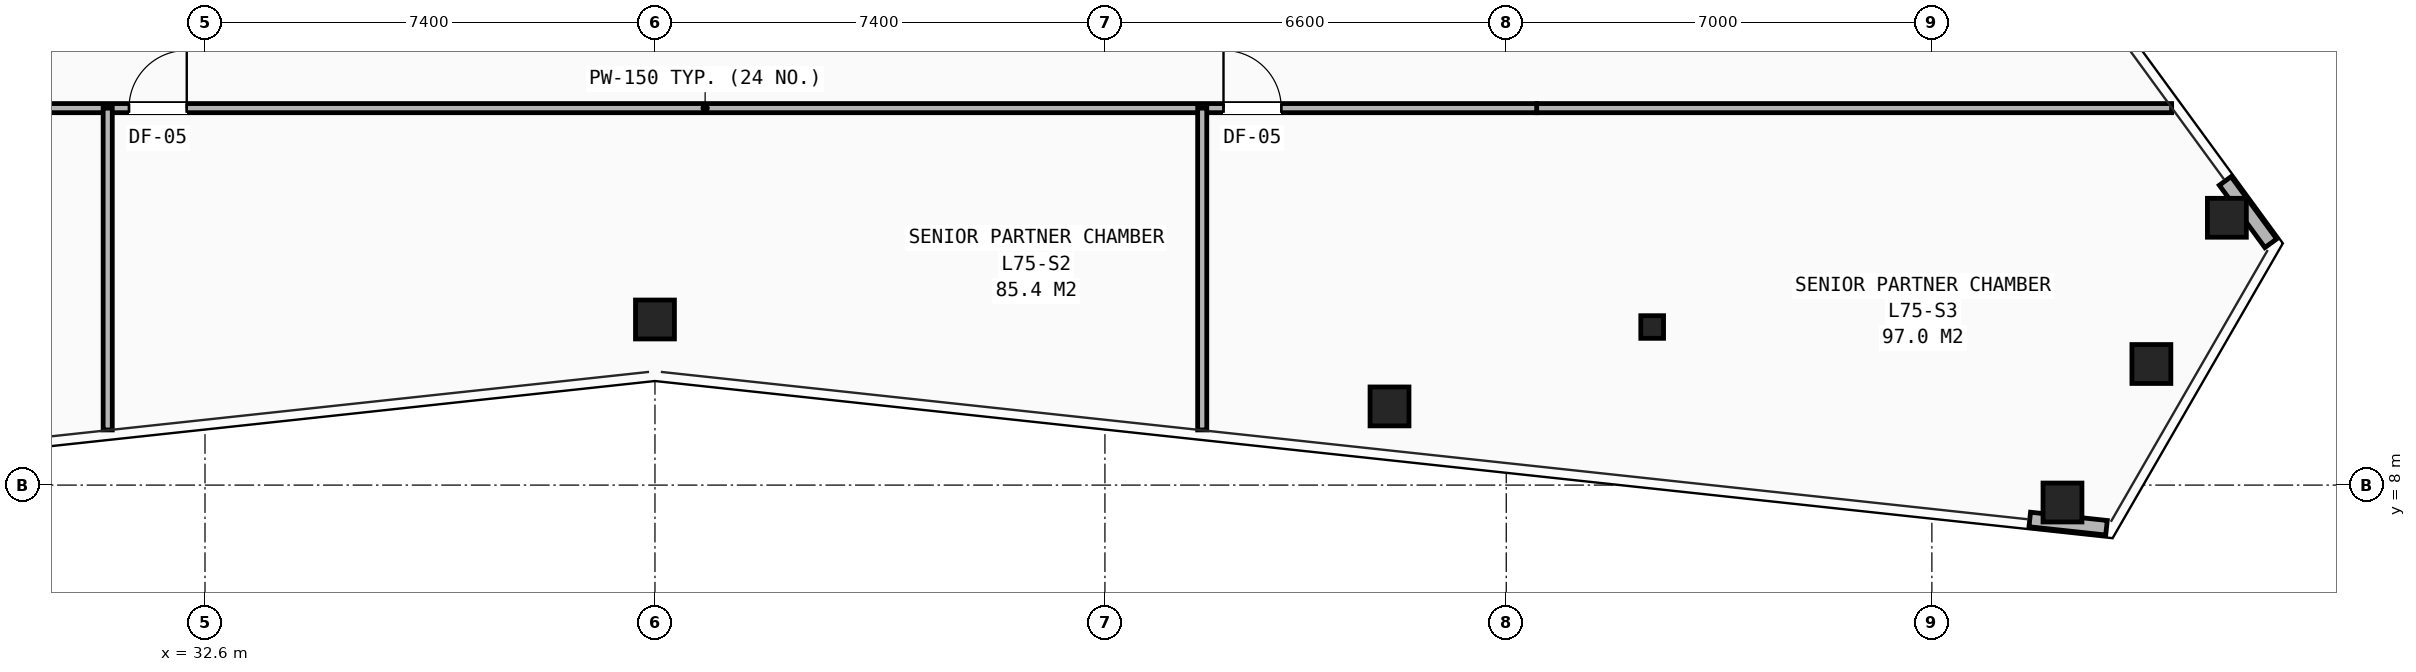
"""IFC4 building model, lengths in metres.
Left out: names, types, materials, properties, quantities, classifications, styles, units other than length and angle.
Written with IfcOpenShell. Run it as: python <this file> out.ifc"""

import sys

from ifc_helpers import new_model, si_unit, direction, frame, frame_2d, origin, origin_2d, place, context, subcontext, project, spatial, rectangle, hollow_rectangle, i_section, extrude, element, fill, save


model = new_model("IFC4")
c1 = context("Model", 3, precision=1e-05, world=origin(), true_north=direction((0.0, 1.0)))
c2 = subcontext(c1, "Body", "Model", "MODEL_VIEW")
j1 = project(units=[si_unit("LENGTHUNIT", "METRE"), si_unit("PLANEANGLEUNIT", "RADIAN")], contexts=[c1])
p1 = place(None, origin())
s1 = spatial("IfcSite", under=j1, at=p1, CompositionType="ELEMENT")
p2 = place(p1, origin())
s2 = spatial("IfcBuilding", under=s1, at=p2, CompositionType="ELEMENT")
p3 = place(p2, frame((0.0, 0.0, 265.5)))
s3 = spatial("IfcBuildingStorey", under=s2, at=p3, CompositionType="ELEMENT", Elevation=265.5)
p4 = place(p3, frame((56.4, 10.6, 0.0), z_axis=(0.0, 0.0, 1.0), x_axis=(1.0, 0.0, 0.0)))
e1 = element("IfcColumn", 1, at=p4, inside=s3, PredefinedType="COLUMN", context=c2, shape_type="SweptSolid", body=[
    extrude(i_section(OverallWidth=0.374, OverallDepth=0.372, WebThickness=0.016, FlangeThickness=0.026, at=origin_2d()), origin(), (0.0, 0.0, 1.0), 3.5),
])
for number, where, z_axis, x_axis in (
    (2, (40.0, 10.724, 0.0), (0.0, 0.0, 1.0), (1.0, 0.0, 0.0)),
    (3, (52.08, 9.294, 0.0), (0.0, 0.0, 1.0), (1.0, 0.0, 0.0)),
    (4, (63.148, 7.714, 0.0), (0.0, 0.0, 1.0), (1.0, 0.0, 0.0)),
    (5, (64.61, 9.991, 0.0), (0.0, 0.0, 1.0), (1.0, 0.0, 0.0)),
    (6, (65.851, 12.397, 0.0), (0.0, 0.0, 1.0), (1.0, 0.0, 0.0)),
):
    element("IfcColumn", number, at=place(p3, frame(where, z_axis=z_axis, x_axis=x_axis)), inside=s3, PredefinedType="COLUMN", context=c2, shape_type="SweptSolid", body=[
        extrude(hollow_rectangle(XDim=0.64, YDim=0.64, WallThickness=0.045, at=origin_2d()), origin(), (0.0, 0.0, 1.0), 3.5),
    ])
for number, where, z_axis, x_axis in (
    (7, (62.61, 7.435, 0.0), (0.0, 0.0, 1.0), (0.994, -0.107, 0.0)),
    (8, (66.573, 11.977, 0.0), (0.0, 0.0, 1.0), (-0.59, 0.807, 0.0)),
):
    element("IfcWall", number, at=place(p3, frame(where, z_axis=z_axis, x_axis=x_axis)), inside=s3, PredefinedType="SHEAR", context=c2, shape_type="SweptSolid", body=[
        extrude(rectangle(XDim=1.269, YDim=0.24, at=frame_2d((0.635, 0.0))), origin(), (0.0, 0.0, 1.0), 2.623),
    ])
p5 = place(p3, frame((54.5, 14.2, 0.0), z_axis=(0.0, 0.0, 1.0), x_axis=(1.0, 0.0, 0.0)))
e9 = element("IfcWall", 9, at=p5, inside=s3, PredefinedType="PARTITIONING", context=c2, shape_type="SweptSolid", body=[
    extrude(rectangle(XDim=10.443, YDim=0.15, at=frame_2d((5.221, 0.0))), origin(), (0.0, 0.0, 1.0), 2.292),
])
p6 = place(p3, frame((25.5, 14.2, 0.0), z_axis=(0.0, 0.0, 1.0), x_axis=(1.0, 0.0, 0.0)))
e10 = element("IfcWall", 10, at=p6, inside=s3, PredefinedType="PARTITIONING", context=c2, shape_type="SweptSolid", body=[
    extrude(rectangle(XDim=29.0, YDim=0.15, at=frame_2d((14.5, 0.0))), origin(), (0.0, 0.0, 1.0), 2.292),
])
p7 = place(p6, frame((0.85, 0.0, 0.0)))
e11 = element("IfcOpeningElement", 11, at=p7, cuts=e10, PredefinedType="OPENING", context=c2, shape_type="SweptSolid", body=[
    extrude(rectangle(XDim=0.95, YDim=2.1, at=frame_2d((0.475, 1.05))), frame((0.0, 0.085, 0.0), z_axis=(0.0, -1.0, 0.0), x_axis=(1.0, 0.0, 0.0)), (0.0, 0.0, 1.0), 0.17),
])
p8 = place(p6, frame((5.85, 0.0, 0.0)))
e12 = element("IfcOpeningElement", 12, at=p8, cuts=e10, PredefinedType="OPENING", context=c2, shape_type="SweptSolid", body=[
    extrude(rectangle(XDim=0.95, YDim=2.1, at=frame_2d((0.475, 1.05))), frame((0.0, 0.085, 0.0), z_axis=(0.0, -1.0, 0.0), x_axis=(1.0, 0.0, 0.0)), (0.0, 0.0, 1.0), 0.17),
])
p9 = place(p6, frame((23.85, 0.0, 0.0)))
e13 = element("IfcOpeningElement", 13, at=p9, cuts=e10, PredefinedType="OPENING", context=c2, shape_type="SweptSolid", body=[
    extrude(rectangle(XDim=0.95, YDim=2.1, at=frame_2d((0.475, 1.05))), frame((0.0, 0.085, 0.0), z_axis=(0.0, -1.0, 0.0), x_axis=(1.0, 0.0, 0.0)), (0.0, 0.0, 1.0), 0.17),
])
for number, where, z_axis, x_axis in (
    (14, (31.0, 8.907, 0.0), (0.0, 0.0, 1.0), (0.0, 1.0, 0.0)),
    (15, (49.0, 8.907, 0.0), (0.0, 0.0, 1.0), (0.0, 1.0, 0.0)),
):
    element("IfcWall", number, at=place(p3, frame(where, z_axis=z_axis, x_axis=x_axis)), inside=s3, PredefinedType="PARTITIONING", context=c2, shape_type="SweptSolid", body=[
        extrude(rectangle(XDim=5.293, YDim=0.15, at=frame_2d((2.646, 0.0))), origin(), (0.0, 0.0, 1.0), 2.628),
    ])
p10 = place(p8, origin())
e16 = element("IfcDoor", 16, at=p10, inside=s3, OperationType="SINGLE_SWING_RIGHT", PredefinedType="DOOR", context=c2, shape_type="SweptSolid", body=[
    extrude(rectangle(XDim=0.95, YDim=2.1, at=frame_2d((0.475, 1.05))), frame((0.0, 0.025, 0.0), z_axis=(0.0, -1.0, 0.0), x_axis=(1.0, 0.0, 0.0)), (0.0, 0.0, 1.0), 0.05),
])
fill(e12, e16)
p11 = place(p9, origin())
e17 = element("IfcDoor", 17, at=p11, inside=s3, OperationType="SINGLE_SWING_LEFT", PredefinedType="DOOR", context=c2, shape_type="SweptSolid", body=[
    extrude(rectangle(XDim=0.95, YDim=2.1, at=frame_2d((0.475, 1.05))), frame((0.0, 0.025, 0.0), z_axis=(0.0, -1.0, 0.0), x_axis=(1.0, 0.0, 0.0)), (0.0, 0.0, 1.0), 0.05),
])
fill(e13, e17)
save(model, sys.argv[1])
